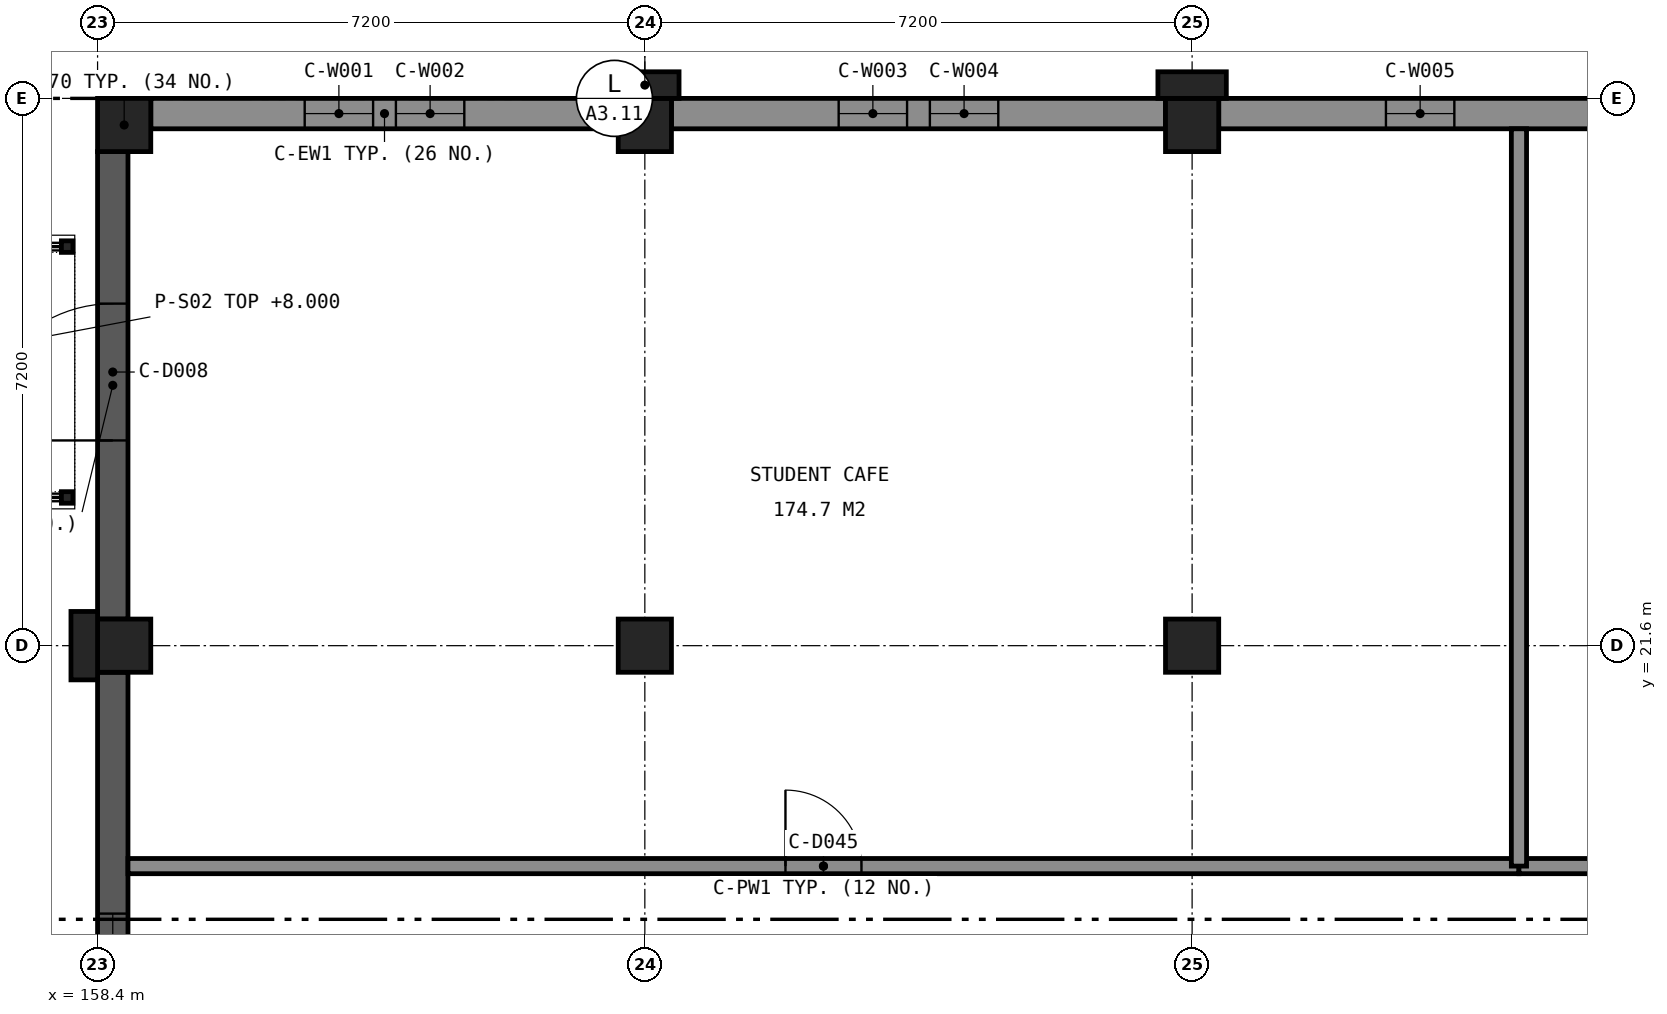
"""IFC4 building model, lengths in metres.
Left out: names, types, materials, properties, quantities, classifications, styles, units other than length and angle.
Written with IfcOpenShell. Run it as: python <this file> out.ifc"""

import sys

from ifc_helpers import new_model, si_unit, direction, frame, frame_2d, origin, origin_2d, place, context, subcontext, project, spatial, rectangle, hollow_rectangle, extrude, element, fill, save


model = new_model("IFC4")
c1 = context("Model", 3, precision=1e-05, world=origin(), true_north=direction((0.0, 1.0)))
c2 = subcontext(c1, "Body", "Model", "MODEL_VIEW")
j1 = project(units=[si_unit("LENGTHUNIT", "METRE"), si_unit("PLANEANGLEUNIT", "RADIAN")], contexts=[c1])
p1 = place(None, origin())
s1 = spatial("IfcSite", under=j1, at=p1, CompositionType="ELEMENT")
p2 = place(p1, origin())
s2 = spatial("IfcBuilding", under=s1, at=p2, CompositionType="ELEMENT")
p3 = place(p2, frame((0.0, 0.0, 4.8)))
s3 = spatial("IfcBuildingStorey", under=s2, at=p3, CompositionType="ELEMENT", Elevation=4.8)
for number, where, z_axis, x_axis in (
    (1, (158.75, 28.45, 0.0), (0.0, 0.0, 1.0), (1.0, 0.0, 0.0)),
    (2, (165.6, 28.45, 0.0), (0.0, 0.0, 1.0), (1.0, 0.0, 0.0)),
    (3, (172.8, 28.45, 0.0), (0.0, 0.0, 1.0), (1.0, 0.0, 0.0)),
    (4, (158.75, 21.6, 0.0), (0.0, 0.0, 1.0), (1.0, 0.0, 0.0)),
    (5, (165.6, 21.6, 0.0), (0.0, 0.0, 1.0), (1.0, 0.0, 0.0)),
    (6, (172.8, 21.6, 0.0), (0.0, 0.0, 1.0), (1.0, 0.0, 0.0)),
):
    element("IfcColumn", number, at=place(p3, frame(where, z_axis=z_axis, x_axis=x_axis)), inside=s3, PredefinedType="COLUMN", context=c2, shape_type="SweptSolid", body=[
        extrude(rectangle(XDim=0.7, YDim=0.7, at=origin_2d()), origin(), (0.0, 0.0, 1.0), 4.8),
    ])
p4 = place(p3, frame((159.1, 28.6, 0.0), z_axis=(0.0, 0.0, 1.0), x_axis=(1.0, 0.0, 0.0)))
e7 = element("IfcWall", 7, at=p4, inside=s3, PredefinedType="SOLIDWALL", context=c2, shape_type="SweptSolid", body=[
    extrude(rectangle(XDim=6.15, YDim=0.4, at=frame_2d((3.075, 0.0))), origin(), (0.0, 0.0, 1.0), 3.95),
])
p5 = place(p4, frame((2.025, 0.0, 1.0)))
e8 = element("IfcOpeningElement", 8, at=p5, cuts=e7, PredefinedType="OPENING", context=c2, shape_type="SweptSolid", body=[
    extrude(rectangle(XDim=0.9, YDim=2.1, at=frame_2d((0.45, 1.05))), frame((0.0, 0.21, 0.0), z_axis=(0.0, -1.0, 0.0), x_axis=(1.0, 0.0, 0.0)), (0.0, 0.0, 1.0), 0.42),
])
p6 = place(p4, frame((3.225, 0.0, 1.0)))
e9 = element("IfcOpeningElement", 9, at=p6, cuts=e7, PredefinedType="OPENING", context=c2, shape_type="SweptSolid", body=[
    extrude(rectangle(XDim=0.9, YDim=2.1, at=frame_2d((0.45, 1.05))), frame((0.0, 0.21, 0.0), z_axis=(0.0, -1.0, 0.0), x_axis=(1.0, 0.0, 0.0)), (0.0, 0.0, 1.0), 0.42),
])
p7 = place(p3, frame((165.95, 28.6, 0.0), z_axis=(0.0, 0.0, 1.0), x_axis=(1.0, 0.0, 0.0)))
e10 = element("IfcWall", 10, at=p7, inside=s3, PredefinedType="SOLIDWALL", context=c2, shape_type="SweptSolid", body=[
    extrude(rectangle(XDim=6.5, YDim=0.4, at=frame_2d((3.25, 0.0))), origin(), (0.0, 0.0, 1.0), 3.95),
])
p8 = place(p7, frame((2.2, 0.0, 1.0)))
e11 = element("IfcOpeningElement", 11, at=p8, cuts=e10, PredefinedType="OPENING", context=c2, shape_type="SweptSolid", body=[
    extrude(rectangle(XDim=0.9, YDim=2.1, at=frame_2d((0.45, 1.05))), frame((0.0, 0.21, 0.0), z_axis=(0.0, -1.0, 0.0), x_axis=(1.0, 0.0, 0.0)), (0.0, 0.0, 1.0), 0.42),
])
p9 = place(p7, frame((3.4, 0.0, 1.0)))
e12 = element("IfcOpeningElement", 12, at=p9, cuts=e10, PredefinedType="OPENING", context=c2, shape_type="SweptSolid", body=[
    extrude(rectangle(XDim=0.9, YDim=2.1, at=frame_2d((0.45, 1.05))), frame((0.0, 0.21, 0.0), z_axis=(0.0, -1.0, 0.0), x_axis=(1.0, 0.0, 0.0)), (0.0, 0.0, 1.0), 0.42),
])
p10 = place(p3, frame((173.15, 28.6, 0.0), z_axis=(0.0, 0.0, 1.0), x_axis=(1.0, 0.0, 0.0)))
e13 = element("IfcWall", 13, at=p10, inside=s3, PredefinedType="SOLIDWALL", context=c2, shape_type="SweptSolid", body=[
    extrude(rectangle(XDim=6.5, YDim=0.4, at=frame_2d((3.25, 0.0))), origin(), (0.0, 0.0, 1.0), 3.95),
])
p11 = place(p10, frame((2.2, 0.0, 1.0)))
e14 = element("IfcOpeningElement", 14, at=p11, cuts=e13, PredefinedType="OPENING", context=c2, shape_type="SweptSolid", body=[
    extrude(rectangle(XDim=0.9, YDim=2.1, at=frame_2d((0.45, 1.05))), frame((0.0, 0.21, 0.0), z_axis=(0.0, -1.0, 0.0), x_axis=(1.0, 0.0, 0.0)), (0.0, 0.0, 1.0), 0.42),
])
p12 = place(p3, frame((158.6, 21.95, 0.0), z_axis=(0.0, 0.0, 1.0), x_axis=(0.0, 1.0, 0.0)))
e15 = element("IfcWall", 15, at=p12, inside=s3, PredefinedType="SHEAR", context=c2, shape_type="SweptSolid", body=[
    extrude(rectangle(XDim=6.15, YDim=0.4, at=frame_2d((3.075, 0.0))), origin(), (0.0, 0.0, 1.0), 3.95),
])
p13 = place(p12, frame((2.35, 0.0, 0.0)))
e16 = element("IfcOpeningElement", 16, at=p13, cuts=e15, PredefinedType="OPENING", context=c2, shape_type="SweptSolid", body=[
    extrude(rectangle(XDim=1.8, YDim=2.4, at=frame_2d((0.9, 1.2))), frame((0.0, 0.21, 0.0), z_axis=(0.0, -1.0, 0.0), x_axis=(1.0, 0.0, 0.0)), (0.0, 0.0, 1.0), 0.42),
])
p14 = place(p3, frame((158.6, 15.2, 0.0), z_axis=(0.0, 0.0, 1.0), x_axis=(0.0, 1.0, 0.0)))
e17 = element("IfcWall", 17, at=p14, inside=s3, PredefinedType="SHEAR", context=c2, shape_type="SweptSolid", body=[
    extrude(rectangle(XDim=6.05, YDim=0.4, at=frame_2d((3.025, 0.0))), origin(), (0.0, 0.0, 1.0), 3.95),
])
p15 = place(p14, frame((1.975, 0.0, 1.0)))
e18 = element("IfcOpeningElement", 18, at=p15, cuts=e17, PredefinedType="OPENING", context=c2, shape_type="SweptSolid", body=[
    extrude(rectangle(XDim=0.9, YDim=2.1, at=frame_2d((0.45, 1.05))), frame((0.0, 0.21, 0.0), z_axis=(0.0, -1.0, 0.0), x_axis=(1.0, 0.0, 0.0)), (0.0, 0.0, 1.0), 0.42),
])
for number, where, z_axis, x_axis in (
    (19, (158.0, 23.55, 0.0), (0.0, 0.0, 1.0), (1.0, 0.0, 0.0)),
    (20, (158.0, 26.85, 0.0), (0.0, 0.0, 1.0), (1.0, 0.0, 0.0)),
):
    element("IfcColumn", number, at=place(p3, frame(where, z_axis=z_axis, x_axis=x_axis)), inside=s3, PredefinedType="COLUMN", context=c2, shape_type="SweptSolid", body=[
        extrude(hollow_rectangle(XDim=0.152, YDim=0.152, WallThickness=0.01, at=origin_2d()), origin(), (0.0, 0.0, 1.0), 2.753),
    ])
for number, where, z_axis, x_axis in (
    (21, (165.6, 28.975, 0.0), (0.0, 0.0, 1.0), (1.0, 0.0, 0.0)),
    (22, (172.8, 28.975, 0.0), (0.0, 0.0, 1.0), (1.0, 0.0, 0.0)),
    (23, (158.225, 21.6, 0.0), (0.0, 0.0, 1.0), (0.0, 1.0, 0.0)),
):
    element("IfcColumn", number, at=place(p3, frame(where, z_axis=z_axis, x_axis=x_axis)), inside=s3, PredefinedType="PILASTER", context=c2, shape_type="SweptSolid", body=[
        extrude(rectangle(XDim=0.9, YDim=0.35, at=origin_2d()), origin(), (0.0, 0.0, 1.0), 4.8),
    ])
p16 = place(p3, frame((158.8, 18.7, 0.0), z_axis=(0.0, 0.0, 1.0), x_axis=(1.0, 0.0, 0.0)))
e24 = element("IfcWall", 24, at=p16, inside=s3, PredefinedType="PARTITIONING", context=c2, shape_type="SweptSolid", body=[
    extrude(rectangle(XDim=18.3, YDim=0.2, at=frame_2d((9.15, 0.0))), origin(), (0.0, 0.0, 1.0), 3.95),
])
p17 = place(p16, frame((8.65, 0.0, 0.0)))
e25 = element("IfcOpeningElement", 25, at=p17, cuts=e24, PredefinedType="OPENING", context=c2, shape_type="SweptSolid", body=[
    extrude(rectangle(XDim=1.0, YDim=2.1, at=frame_2d((0.5, 1.05))), frame((0.0, 0.11, 0.0), z_axis=(0.0, -1.0, 0.0), x_axis=(1.0, 0.0, 0.0)), (0.0, 0.0, 1.0), 0.22),
])
p18 = place(p3, frame((177.1, 18.7, 0.0), z_axis=(0.0, 0.0, 1.0), x_axis=(1.0, 0.0, 0.0)))
e26 = element("IfcWall", 26, at=p18, inside=s3, PredefinedType="PARTITIONING", context=c2, shape_type="SweptSolid", body=[
    extrude(rectangle(XDim=28.5, YDim=0.2, at=frame_2d((14.25, 0.0))), origin(), (0.0, 0.0, 1.0), 3.95),
])
p19 = place(p18, frame((13.35, 0.0, 0.0)))
e27 = element("IfcOpeningElement", 27, at=p19, cuts=e26, PredefinedType="OPENING", context=c2, shape_type="SweptSolid", body=[
    extrude(rectangle(XDim=1.8, YDim=2.1, at=frame_2d((0.9, 1.05))), frame((0.0, 0.11, 0.0), z_axis=(0.0, -1.0, 0.0), x_axis=(1.0, 0.0, 0.0)), (0.0, 0.0, 1.0), 0.22),
])
p20 = place(p3, frame((177.1, 28.4, 0.0), z_axis=(0.0, 0.0, 1.0), x_axis=(0.0, -1.0, 0.0)))
e28 = element("IfcWall", 28, at=p20, inside=s3, PredefinedType="PARTITIONING", context=c2, shape_type="SweptSolid", body=[
    extrude(rectangle(XDim=9.7, YDim=0.2, at=frame_2d((4.85, 0.0))), origin(), (0.0, 0.0, 1.0), 3.95),
])
p21 = place(p5, origin())
e29 = element("IfcWindow", 29, at=p21, inside=s3, PartitioningType="SINGLE_PANEL", PredefinedType="WINDOW", context=c2, shape_type="SweptSolid", body=[
    extrude(rectangle(XDim=0.9, YDim=2.1, at=frame_2d((0.45, 1.05))), frame((0.0, -0.09, 0.0), z_axis=(0.0, -1.0, 0.0), x_axis=(1.0, 0.0, 0.0)), (0.0, 0.0, 1.0), 0.06),
])
fill(e8, e29)
p22 = place(p6, origin())
e30 = element("IfcWindow", 30, at=p22, inside=s3, PartitioningType="SINGLE_PANEL", PredefinedType="WINDOW", context=c2, shape_type="SweptSolid", body=[
    extrude(rectangle(XDim=0.9, YDim=2.1, at=frame_2d((0.45, 1.05))), frame((0.0, -0.09, 0.0), z_axis=(0.0, -1.0, 0.0), x_axis=(1.0, 0.0, 0.0)), (0.0, 0.0, 1.0), 0.06),
])
fill(e9, e30)
p23 = place(p8, origin())
e31 = element("IfcWindow", 31, at=p23, inside=s3, PartitioningType="SINGLE_PANEL", PredefinedType="WINDOW", context=c2, shape_type="SweptSolid", body=[
    extrude(rectangle(XDim=0.9, YDim=2.1, at=frame_2d((0.45, 1.05))), frame((0.0, -0.09, 0.0), z_axis=(0.0, -1.0, 0.0), x_axis=(1.0, 0.0, 0.0)), (0.0, 0.0, 1.0), 0.06),
])
fill(e11, e31)
p24 = place(p9, origin())
e32 = element("IfcWindow", 32, at=p24, inside=s3, PartitioningType="SINGLE_PANEL", PredefinedType="WINDOW", context=c2, shape_type="SweptSolid", body=[
    extrude(rectangle(XDim=0.9, YDim=2.1, at=frame_2d((0.45, 1.05))), frame((0.0, -0.09, 0.0), z_axis=(0.0, -1.0, 0.0), x_axis=(1.0, 0.0, 0.0)), (0.0, 0.0, 1.0), 0.06),
])
fill(e12, e32)
p25 = place(p11, origin())
e33 = element("IfcWindow", 33, at=p25, inside=s3, PartitioningType="SINGLE_PANEL", PredefinedType="WINDOW", context=c2, shape_type="SweptSolid", body=[
    extrude(rectangle(XDim=0.9, YDim=2.1, at=frame_2d((0.45, 1.05))), frame((0.0, -0.09, 0.0), z_axis=(0.0, -1.0, 0.0), x_axis=(1.0, 0.0, 0.0)), (0.0, 0.0, 1.0), 0.06),
])
fill(e14, e33)
p26 = place(p13, origin())
e34 = element("IfcDoor", 34, at=p26, inside=s3, OperationType="NOTDEFINED", PredefinedType="DOOR", context=c2, shape_type="SweptSolid", body=[
    extrude(rectangle(XDim=1.8, YDim=2.4, at=frame_2d((0.9, 1.2))), frame((0.0, 0.025, 0.0), z_axis=(0.0, -1.0, 0.0), x_axis=(1.0, 0.0, 0.0)), (0.0, 0.0, 1.0), 0.05),
])
fill(e16, e34)
p27 = place(p15, origin())
e35 = element("IfcWindow", 35, at=p27, inside=s3, PartitioningType="SINGLE_PANEL", PredefinedType="WINDOW", context=c2, shape_type="SweptSolid", body=[
    extrude(rectangle(XDim=0.9, YDim=2.1, at=frame_2d((0.45, 1.05))), frame((0.0, -0.09, 0.0), z_axis=(0.0, -1.0, 0.0), x_axis=(1.0, 0.0, 0.0)), (0.0, 0.0, 1.0), 0.06),
])
fill(e18, e35)
p28 = place(p17, origin())
e36 = element("IfcDoor", 36, at=p28, inside=s3, OperationType="NOTDEFINED", PredefinedType="DOOR", context=c2, shape_type="SweptSolid", body=[
    extrude(rectangle(XDim=1.0, YDim=2.1, at=frame_2d((0.5, 1.05))), frame((0.0, 0.025, 0.0), z_axis=(0.0, -1.0, 0.0), x_axis=(1.0, 0.0, 0.0)), (0.0, 0.0, 1.0), 0.05),
])
fill(e25, e36)
save(model, sys.argv[1])
